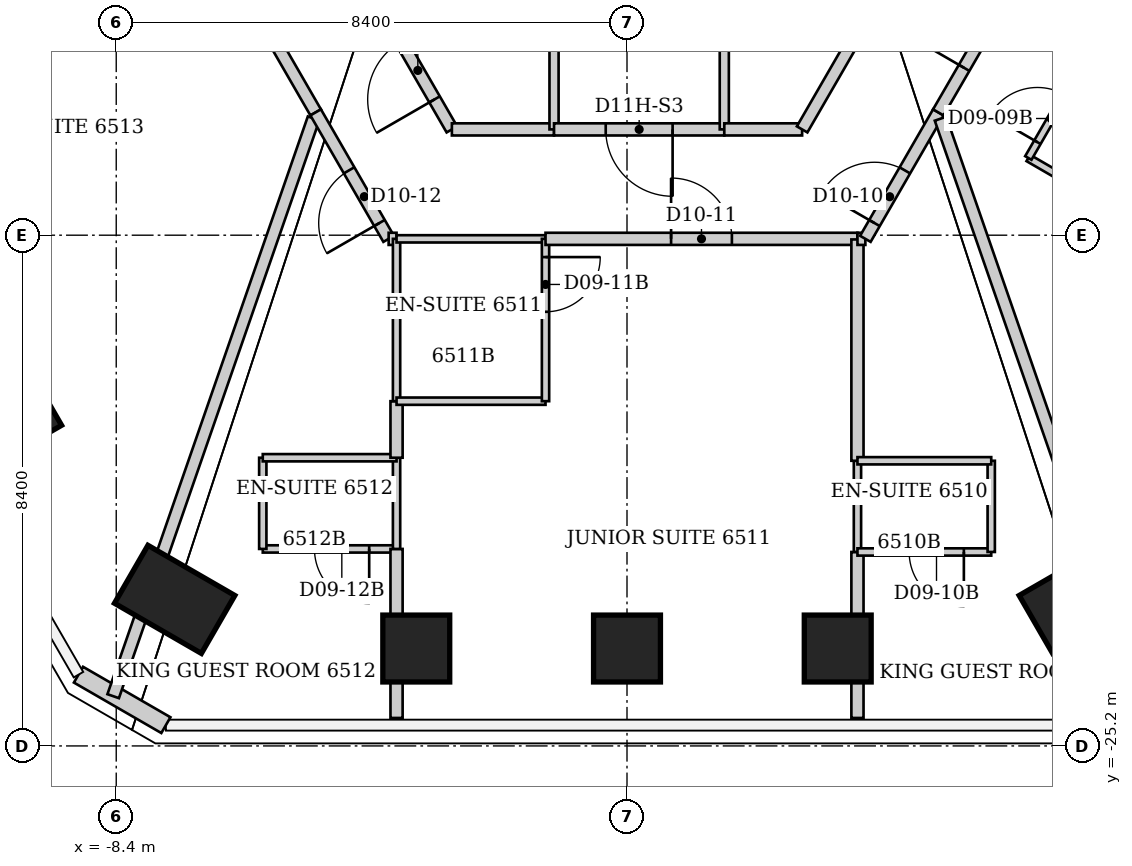
"""IFC4 building model, lengths in metres.
Left out: names, types, materials, properties, quantities, classifications, styles, units other than length and angle.
Written with IfcOpenShell. Run it as: python <this file> out.ifc"""

import sys

from ifc_helpers import new_model, si_unit, direction, frame, frame_2d, origin, origin_2d, place, context, subcontext, project, spatial, rectangle, extrude, element, fill, save


model = new_model("IFC4")
c1 = context("Model", 3, precision=1e-05, world=origin(), true_north=direction((0.0, 1.0)))
c2 = subcontext(c1, "Body", "Model", "MODEL_VIEW")
j1 = project(units=[si_unit("LENGTHUNIT", "METRE"), si_unit("PLANEANGLEUNIT", "RADIAN")], contexts=[c1])
p1 = place(None, origin())
s1 = spatial("IfcSite", under=j1, at=p1, CompositionType="ELEMENT")
p2 = place(p1, origin())
s2 = spatial("IfcBuilding", under=s1, at=p2, CompositionType="ELEMENT")
p3 = place(p2, frame((0.0, 0.0, 260.8)))
s3 = spatial("IfcBuildingStorey", under=s2, at=p3, CompositionType="ELEMENT", Elevation=260.8)
p4 = place(p3, frame((7.439, -22.79, 0.0), z_axis=(0.0, 0.0, 1.0), x_axis=(0.5, -0.866025403784, 0.0)))
e1 = element("IfcColumn", 1, at=p4, inside=s3, PredefinedType="COLUMN", context=c2, shape_type="SweptSolid", body=[
    extrude(rectangle(XDim=1.1, YDim=1.65, at=origin_2d()), origin(), (0.0, 0.0, 1.0), 3.8),
])
for number, where, z_axis, x_axis in (
    (2, (3.466, -23.598, 0.0), (0.0, 0.0, 1.0), (0.0, -1.0, 0.0)),
    (3, (0.0, -23.598, 0.0), (0.0, 0.0, 1.0), (0.0, -1.0, 0.0)),
    (4, (-3.466, -23.598, 0.0), (0.0, 0.0, 1.0), (0.0, -1.0, 0.0)),
):
    element("IfcColumn", number, at=place(p3, frame(where, z_axis=z_axis, x_axis=x_axis)), inside=s3, PredefinedType="COLUMN", context=c2, shape_type="SweptSolid", body=[
        extrude(rectangle(XDim=1.1, YDim=1.1, at=origin_2d()), origin(), (0.0, 0.0, 1.0), 3.8),
    ])
p5 = place(p3, frame((-7.439, -22.79, 0.0), z_axis=(0.0, 0.0, 1.0), x_axis=(-0.5, -0.866025403784, 0.0)))
e5 = element("IfcColumn", 5, at=p5, inside=s3, PredefinedType="COLUMN", context=c2, shape_type="SweptSolid", body=[
    extrude(rectangle(XDim=1.1, YDim=1.65, at=origin_2d()), origin(), (0.0, 0.0, 1.0), 3.8),
])
p6 = place(p3, frame((-10.05, -19.725, 0.0), z_axis=(0.0, 0.0, 1.0), x_axis=(-0.866025403784, -0.5, 0.0)))
e6 = element("IfcColumn", 6, at=p6, inside=s3, PredefinedType="COLUMN", context=c2, shape_type="SweptSolid", body=[
    extrude(rectangle(XDim=1.1, YDim=1.1, at=origin_2d()), origin(), (0.0, 0.0, 1.0), 3.8),
])
p7 = place(p3, frame((-7.583, -24.858, 0.0), z_axis=(0.0, 0.0, 1.0), x_axis=(-0.865989634427, 0.500061949227, 0.0)))
e7 = element("IfcWall", 7, at=p7, inside=s3, PredefinedType="SOLIDWALL", context=c2, shape_type="SweptSolid", body=[
    extrude(rectangle(XDim=1.66, YDim=0.3, at=frame_2d((0.83, 0.0))), origin(), (0.0, 0.0, 1.0), 3.64),
])
p8 = place(p3, frame((-8.45, -24.382, 0.0), z_axis=(0.0, 0.0, 1.0), x_axis=(0.327695764917, 0.944783300898, 0.0)))
e8 = element("IfcWall", 8, at=p8, inside=s3, PredefinedType="PARTITIONING", context=c2, shape_type="SweptSolid", body=[
    extrude(rectangle(XDim=10.058, YDim=0.2, at=frame_2d((5.029, 0.0))), origin(), (0.0, 0.0, 1.0), 3.64),
])
p9 = place(p3, frame((-8.11, -9.6, 0.0), z_axis=(0.0, 0.0, 1.0), x_axis=(0.49991915452, -0.866072074913, 0.0)))
e9 = element("IfcWall", 9, at=p9, inside=s3, PredefinedType="PARTITIONING", context=c2, shape_type="SweptSolid", body=[
    extrude(rectangle(XDim=5.981, YDim=0.2, at=frame_2d((2.99, 0.0))), origin(), (0.0, 0.0, 1.0), 3.64),
])
p10 = place(p9, frame((2.49, 0.0, 0.0)))
e10 = element("IfcOpeningElement", 10, at=p10, cuts=e9, PredefinedType="OPENING", context=c2, shape_type="SweptSolid", body=[
    extrude(rectangle(XDim=1.0, YDim=2.13, at=frame_2d((0.5, 1.065))), frame((0.0, 0.1, 0.0), z_axis=(0.0, -1.0, 0.0), x_axis=(1.0, 0.0, 0.0)), (0.0, 0.0, 1.0), 0.2),
])
p11 = place(p3, frame((-5.99, -21.96, 0.0), z_axis=(0.0, 0.0, 1.0), x_axis=(1.0, 0.0, 0.0)))
e11 = element("IfcWall", 11, at=p11, inside=s3, PredefinedType="PARTITIONING", context=c2, shape_type="SweptSolid", body=[
    extrude(rectangle(XDim=2.2, YDim=0.12, at=frame_2d((1.1, 0.0))), origin(), (0.0, 0.0, 1.0), 3.64),
])
p12 = place(p11, frame((0.85, 0.0, 0.0)))
e12 = element("IfcOpeningElement", 12, at=p12, cuts=e11, PredefinedType="OPENING", context=c2, shape_type="SweptSolid", body=[
    extrude(rectangle(XDim=0.9, YDim=2.03, at=frame_2d((0.45, 1.015))), frame((0.0, 0.06, 0.0), z_axis=(0.0, -1.0, 0.0), x_axis=(1.0, 0.0, 0.0)), (0.0, 0.0, 1.0), 0.12),
])
p13 = place(p3, frame((-5.99, -20.46, 0.0), z_axis=(0.0, 0.0, 1.0), x_axis=(0.0, -1.0, 0.0)))
e13 = element("IfcWall", 13, at=p13, inside=s3, PredefinedType="PARTITIONING", context=c2, shape_type="SweptSolid", body=[
    extrude(rectangle(XDim=1.5, YDim=0.12, at=frame_2d((0.75, 0.0))), origin(), (0.0, 0.0, 1.0), 3.64),
])
p14 = place(p3, frame((-5.12, -14.78, 0.0), z_axis=(0.0, 0.0, 1.0), x_axis=(0.499813401482, -0.866133109688, 0.0)))
e14 = element("IfcWall", 14, at=p14, inside=s3, PredefinedType="PARTITIONING", context=c2, shape_type="SweptSolid", body=[
    extrude(rectangle(XDim=2.401, YDim=0.2, at=frame_2d((1.201, 0.0))), origin(), (0.0, 0.0, 1.0), 3.64),
])
p15 = place(p14, frame((1.1, 0.0, 0.0)))
e15 = element("IfcOpeningElement", 15, at=p15, cuts=e14, PredefinedType="OPENING", context=c2, shape_type="SweptSolid", body=[
    extrude(rectangle(XDim=1.0, YDim=2.13, at=frame_2d((0.5, 1.065))), frame((0.0, 0.1, 0.0), z_axis=(0.0, -1.0, 0.0), x_axis=(1.0, 0.0, 0.0)), (0.0, 0.0, 1.0), 0.2),
])
p16 = place(p3, frame((-3.92, -16.86, 0.0), z_axis=(0.0, 0.0, 1.0), x_axis=(1.0, 0.0, 0.0)))
e16 = element("IfcWall", 16, at=p16, inside=s3, PredefinedType="PARTITIONING", context=c2, shape_type="SweptSolid", body=[
    extrude(rectangle(XDim=0.13, YDim=0.2, at=frame_2d((0.065, 0.0))), origin(), (0.0, 0.0, 1.0), 3.64),
])
p17 = place(p3, frame((-3.79, -24.74, 0.0), z_axis=(0.0, 0.0, 1.0), x_axis=(0.0, 1.0, 0.0)))
e17 = element("IfcWall", 17, at=p17, inside=s3, PredefinedType="PARTITIONING", context=c2, shape_type="SweptSolid", body=[
    extrude(rectangle(XDim=2.78, YDim=0.2, at=frame_2d((1.39, 0.0))), origin(), (0.0, 0.0, 1.0), 3.64),
])
p18 = place(p3, frame((-3.79, -21.96, 0.0), z_axis=(0.0, 0.0, 1.0), x_axis=(0.0, 1.0, 0.0)))
e18 = element("IfcWall", 18, at=p18, inside=s3, PredefinedType="PARTITIONING", context=c2, shape_type="SweptSolid", body=[
    extrude(rectangle(XDim=1.5, YDim=0.12, at=frame_2d((0.75, 0.0))), origin(), (0.0, 0.0, 1.0), 3.64),
])
p19 = place(p3, frame((-3.79, -20.46, 0.0), z_axis=(0.0, 0.0, 1.0), x_axis=(-1.0, 0.0, 0.0)))
e19 = element("IfcWall", 19, at=p19, inside=s3, PredefinedType="PARTITIONING", context=c2, shape_type="SweptSolid", body=[
    extrude(rectangle(XDim=2.2, YDim=0.12, at=frame_2d((1.1, 0.0))), origin(), (0.0, 0.0, 1.0), 3.64),
])
p20 = place(p3, frame((-3.79, -20.46, 0.0), z_axis=(0.0, 0.0, 1.0), x_axis=(0.0, 1.0, 0.0)))
e20 = element("IfcWall", 20, at=p20, inside=s3, PredefinedType="PARTITIONING", context=c2, shape_type="SweptSolid", body=[
    extrude(rectangle(XDim=0.93, YDim=0.2, at=frame_2d((0.465, 0.0))), origin(), (0.0, 0.0, 1.0), 3.64),
])
p21 = place(p3, frame((-3.79, -19.53, 0.0), z_axis=(0.0, 0.0, 1.0), x_axis=(0.0, 1.0, 0.0)))
e21 = element("IfcWall", 21, at=p21, inside=s3, PredefinedType="PARTITIONING", context=c2, shape_type="SweptSolid", body=[
    extrude(rectangle(XDim=2.67, YDim=0.12, at=frame_2d((1.335, 0.0))), origin(), (0.0, 0.0, 1.0), 3.64),
])
for number, where, z_axis, x_axis in (
    (22, (-3.79, -19.53, 0.0), (0.0, 0.0, 1.0), (1.0, 0.0, 0.0)),
    (23, (-3.79, -16.86, 0.0), (0.0, 0.0, 1.0), (1.0, 0.0, 0.0)),
):
    element("IfcWall", number, at=place(p3, frame(where, z_axis=z_axis, x_axis=x_axis)), inside=s3, PredefinedType="PARTITIONING", context=c2, shape_type="SweptSolid", body=[
        extrude(rectangle(XDim=2.45, YDim=0.12, at=frame_2d((1.225, 0.0))), origin(), (0.0, 0.0, 1.0), 3.64),
    ])
p22 = place(p3, frame((-2.88, -15.06, 0.0), z_axis=(0.0, 0.0, 1.0), x_axis=(-0.499983441833, 0.866034963436, 0.0)))
e24 = element("IfcWall", 24, at=p22, inside=s3, PredefinedType="PARTITIONING", context=c2, shape_type="SweptSolid", body=[
    extrude(rectangle(XDim=2.24, YDim=0.2, at=frame_2d((1.12, 0.0))), origin(), (0.0, 0.0, 1.0), 3.64),
])
p23 = place(p22, frame((0.57, 0.0, 0.0)))
e25 = element("IfcOpeningElement", 25, at=p23, cuts=e24, PredefinedType="OPENING", context=c2, shape_type="SweptSolid", body=[
    extrude(rectangle(XDim=1.1, YDim=2.2, at=frame_2d((0.55, 1.1))), frame((0.0, 0.1, 0.0), z_axis=(0.0, -1.0, 0.0), x_axis=(1.0, 0.0, 0.0)), (0.0, 0.0, 1.0), 0.2),
])
p24 = place(p3, frame((-1.34, -19.53, 0.0), z_axis=(0.0, 0.0, 1.0), x_axis=(0.0, 1.0, 0.0)))
e26 = element("IfcWall", 26, at=p24, inside=s3, PredefinedType="PARTITIONING", context=c2, shape_type="SweptSolid", body=[
    extrude(rectangle(XDim=2.67, YDim=0.12, at=frame_2d((1.335, 0.0))), origin(), (0.0, 0.0, 1.0), 3.64),
])
p25 = place(p24, frame((1.47, 0.0, 0.0)))
e27 = element("IfcOpeningElement", 27, at=p25, cuts=e26, PredefinedType="OPENING", context=c2, shape_type="SweptSolid", body=[
    extrude(rectangle(XDim=0.9, YDim=2.03, at=frame_2d((0.45, 1.015))), frame((0.0, 0.06, 0.0), z_axis=(0.0, -1.0, 0.0), x_axis=(1.0, 0.0, 0.0)), (0.0, 0.0, 1.0), 0.12),
])
p26 = place(p3, frame((-1.34, -16.86, 0.0), z_axis=(0.0, 0.0, 1.0), x_axis=(1.0, 0.0, 0.0)))
e28 = element("IfcWall", 28, at=p26, inside=s3, PredefinedType="PARTITIONING", context=c2, shape_type="SweptSolid", body=[
    extrude(rectangle(XDim=5.13, YDim=0.2, at=frame_2d((2.565, 0.0))), origin(), (0.0, 0.0, 1.0), 3.64),
])
p27 = place(p26, frame((2.065, 0.0, 0.0)))
e29 = element("IfcOpeningElement", 29, at=p27, cuts=e28, PredefinedType="OPENING", context=c2, shape_type="SweptSolid", body=[
    extrude(rectangle(XDim=1.0, YDim=2.13, at=frame_2d((0.5, 1.065))), frame((0.0, 0.1, 0.0), z_axis=(0.0, -1.0, 0.0), x_axis=(1.0, 0.0, 0.0)), (0.0, 0.0, 1.0), 0.2),
])
p28 = place(p3, frame((-1.2, -15.06, 0.0), z_axis=(0.0, 0.0, 1.0), x_axis=(-1.0, 0.0, 0.0)))
e30 = element("IfcWall", 30, at=p28, inside=s3, PredefinedType="PARTITIONING", context=c2, shape_type="SweptSolid", body=[
    extrude(rectangle(XDim=1.68, YDim=0.2, at=frame_2d((0.84, 0.0))), origin(), (0.0, 0.0, 1.0), 3.64),
])
p29 = place(p3, frame((-1.2, -6.7, 0.0), z_axis=(0.0, 0.0, 1.0), x_axis=(0.0, -1.0, 0.0)))
e31 = element("IfcWall", 31, at=p29, inside=s3, PredefinedType="PARTITIONING", context=c2, shape_type="SweptSolid", body=[
    extrude(rectangle(XDim=8.36, YDim=0.15, at=frame_2d((4.18, 0.0))), origin(), (0.0, 0.0, 1.0), 3.64),
])
p30 = place(p3, frame((1.6, -15.06, 0.0), z_axis=(0.0, 0.0, 1.0), x_axis=(-1.0, 0.0, 0.0)))
e32 = element("IfcWall", 32, at=p30, inside=s3, PredefinedType="PARTITIONING", context=c2, shape_type="SweptSolid", body=[
    extrude(rectangle(XDim=2.8, YDim=0.2, at=frame_2d((1.4, 0.0))), origin(), (0.0, 0.0, 1.0), 3.64),
])
p31 = place(p30, frame((0.85, 0.0, 0.0)))
e33 = element("IfcOpeningElement", 33, at=p31, cuts=e32, PredefinedType="OPENING", context=c2, shape_type="SweptSolid", body=[
    extrude(rectangle(XDim=1.1, YDim=2.2, at=frame_2d((0.55, 1.1))), frame((0.0, 0.1, 0.0), z_axis=(0.0, -1.0, 0.0), x_axis=(1.0, 0.0, 0.0)), (0.0, 0.0, 1.0), 0.2),
])
p32 = place(p3, frame((1.6, -6.7, 0.0), z_axis=(0.0, 0.0, 1.0), x_axis=(0.0, -1.0, 0.0)))
e34 = element("IfcWall", 34, at=p32, inside=s3, PredefinedType="PARTITIONING", context=c2, shape_type="SweptSolid", body=[
    extrude(rectangle(XDim=8.36, YDim=0.15, at=frame_2d((4.18, 0.0))), origin(), (0.0, 0.0, 1.0), 2.86),
])
p33 = place(p3, frame((2.88, -15.06, 0.0), z_axis=(0.0, 0.0, 1.0), x_axis=(-1.0, 0.0, 0.0)))
e35 = element("IfcWall", 35, at=p33, inside=s3, PredefinedType="PARTITIONING", context=c2, shape_type="SweptSolid", body=[
    extrude(rectangle(XDim=1.28, YDim=0.2, at=frame_2d((0.64, 0.0))), origin(), (0.0, 0.0, 1.0), 3.64),
])
p34 = place(p3, frame((3.79, -24.74, 0.0), z_axis=(0.0, 0.0, 1.0), x_axis=(0.0, 1.0, 0.0)))
e36 = element("IfcWall", 36, at=p34, inside=s3, PredefinedType="PARTITIONING", context=c2, shape_type="SweptSolid", body=[
    extrude(rectangle(XDim=2.73, YDim=0.2, at=frame_2d((1.365, 0.0))), origin(), (0.0, 0.0, 1.0), 3.64),
])
p35 = place(p3, frame((3.79, -22.01, 0.0), z_axis=(0.0, 0.0, 1.0), x_axis=(0.0, 1.0, 0.0)))
e37 = element("IfcWall", 37, at=p35, inside=s3, PredefinedType="PARTITIONING", context=c2, shape_type="SweptSolid", body=[
    extrude(rectangle(XDim=1.5, YDim=0.12, at=frame_2d((0.75, 0.0))), origin(), (0.0, 0.0, 1.0), 3.64),
])
p36 = place(p3, frame((3.79, -22.01, 0.0), z_axis=(0.0, 0.0, 1.0), x_axis=(1.0, 0.0, 0.0)))
e38 = element("IfcWall", 38, at=p36, inside=s3, PredefinedType="PARTITIONING", context=c2, shape_type="SweptSolid", body=[
    extrude(rectangle(XDim=2.2, YDim=0.12, at=frame_2d((1.1, 0.0))), origin(), (0.0, 0.0, 1.0), 3.64),
])
p37 = place(p36, frame((0.85, 0.0, 0.0)))
e39 = element("IfcOpeningElement", 39, at=p37, cuts=e38, PredefinedType="OPENING", context=c2, shape_type="SweptSolid", body=[
    extrude(rectangle(XDim=0.9, YDim=2.03, at=frame_2d((0.45, 1.015))), frame((0.0, 0.06, 0.0), z_axis=(0.0, -1.0, 0.0), x_axis=(1.0, 0.0, 0.0)), (0.0, 0.0, 1.0), 0.12),
])
p38 = place(p3, frame((3.79, -20.51, 0.0), z_axis=(0.0, 0.0, 1.0), x_axis=(0.0, 1.0, 0.0)))
e40 = element("IfcWall", 40, at=p38, inside=s3, PredefinedType="PARTITIONING", context=c2, shape_type="SweptSolid", body=[
    extrude(rectangle(XDim=3.64, YDim=0.2, at=frame_2d((1.82, 0.0))), origin(), (0.0, 0.0, 1.0), 3.64),
])
p39 = place(p3, frame((3.79, -16.86, 0.0), z_axis=(0.0, 0.0, 1.0), x_axis=(1.0, 0.0, 0.0)))
e41 = element("IfcWall", 41, at=p39, inside=s3, PredefinedType="PARTITIONING", context=c2, shape_type="SweptSolid", body=[
    extrude(rectangle(XDim=0.13, YDim=0.2, at=frame_2d((0.065, 0.0))), origin(), (0.0, 0.0, 1.0), 3.64),
])
p40 = place(p3, frame((3.92, -16.86, 0.0), z_axis=(0.0, 0.0, 1.0), x_axis=(0.499693115345, 0.866202511239, 0.0)))
e42 = element("IfcWall", 42, at=p40, inside=s3, PredefinedType="PARTITIONING", context=c2, shape_type="SweptSolid", body=[
    extrude(rectangle(XDim=2.401, YDim=0.2, at=frame_2d((1.201, 0.0))), origin(), (0.0, 0.0, 1.0), 3.64),
])
p41 = place(p40, frame((0.3, 0.0, 0.0)))
e43 = element("IfcOpeningElement", 43, at=p41, cuts=e42, PredefinedType="OPENING", context=c2, shape_type="SweptSolid", body=[
    extrude(rectangle(XDim=1.0, YDim=2.13, at=frame_2d((0.5, 1.065))), frame((0.0, 0.1, 0.0), z_axis=(0.0, -1.0, 0.0), x_axis=(1.0, 0.0, 0.0)), (0.0, 0.0, 1.0), 0.2),
])
p42 = place(p3, frame((5.12, -14.78, 0.0), z_axis=(0.0, 0.0, 1.0), x_axis=(0.501343576294, 0.865248298761, 0.0)))
e44 = element("IfcWall", 44, at=p42, inside=s3, PredefinedType="PARTITIONING", context=c2, shape_type="SweptSolid", body=[
    extrude(rectangle(XDim=2.693, YDim=0.2, at=frame_2d((1.346, 0.0))), origin(), (0.0, 0.0, 1.0), 3.64),
])
p43 = place(p42, frame((0.846, 0.0, 0.0)))
e45 = element("IfcOpeningElement", 45, at=p43, cuts=e44, PredefinedType="OPENING", context=c2, shape_type="SweptSolid", body=[
    extrude(rectangle(XDim=1.0, YDim=2.13, at=frame_2d((0.5, 1.065))), frame((0.0, 0.1, 0.0), z_axis=(0.0, -1.0, 0.0), x_axis=(1.0, 0.0, 0.0)), (0.0, 0.0, 1.0), 0.2),
])
p44 = place(p3, frame((5.99, -22.01, 0.0), z_axis=(0.0, 0.0, 1.0), x_axis=(0.0, 1.0, 0.0)))
e46 = element("IfcWall", 46, at=p44, inside=s3, PredefinedType="PARTITIONING", context=c2, shape_type="SweptSolid", body=[
    extrude(rectangle(XDim=1.5, YDim=0.12, at=frame_2d((0.75, 0.0))), origin(), (0.0, 0.0, 1.0), 3.64),
])
p45 = place(p3, frame((5.99, -20.51, 0.0), z_axis=(0.0, 0.0, 1.0), x_axis=(-1.0, 0.0, 0.0)))
e47 = element("IfcWall", 47, at=p45, inside=s3, PredefinedType="PARTITIONING", context=c2, shape_type="SweptSolid", body=[
    extrude(rectangle(XDim=2.2, YDim=0.12, at=frame_2d((1.1, 0.0))), origin(), (0.0, 0.0, 1.0), 3.64),
])
p46 = place(p3, frame((6.6, -15.53, 0.0), z_axis=(0.0, 0.0, 1.0), x_axis=(0.865130376012, -0.501547039172, 0.0)))
e48 = element("IfcWall", 48, at=p46, inside=s3, PredefinedType="PARTITIONING", context=c2, shape_type="SweptSolid", body=[
    extrude(rectangle(XDim=2.393, YDim=0.12, at=frame_2d((1.196, 0.0))), origin(), (0.0, 0.0, 1.0), 3.64),
])
p47 = place(p3, frame((7.68, -6.75, 0.0), z_axis=(0.0, 0.0, 1.0), x_axis=(-0.500174600737, -0.865924574532, 0.0)))
e49 = element("IfcWall", 49, at=p47, inside=s3, PredefinedType="PARTITIONING", context=c2, shape_type="SweptSolid", body=[
    extrude(rectangle(XDim=9.597, YDim=0.2, at=frame_2d((4.798, 0.0))), origin(), (0.0, 0.0, 1.0), 3.64),
])
p48 = place(p47, frame((4.248, 0.0, 0.0)))
e50 = element("IfcOpeningElement", 50, at=p48, cuts=e49, PredefinedType="OPENING", context=c2, shape_type="SweptSolid", body=[
    extrude(rectangle(XDim=1.1, YDim=2.2, at=frame_2d((0.55, 1.1))), frame((0.0, 0.1, 0.0), z_axis=(0.0, -1.0, 0.0), x_axis=(1.0, 0.0, 0.0)), (0.0, 0.0, 1.0), 0.2),
])
p49 = place(p3, frame((7.9, -13.28, 0.0), z_axis=(0.0, 0.0, 1.0), x_axis=(-0.500221244143, -0.865897630733, 0.0)))
e51 = element("IfcWall", 51, at=p49, inside=s3, PredefinedType="PARTITIONING", context=c2, shape_type="SweptSolid", body=[
    extrude(rectangle(XDim=2.598, YDim=0.12, at=frame_2d((1.299, 0.0))), origin(), (0.0, 0.0, 1.0), 3.64),
])
p50 = place(p49, frame((1.399, 0.0, 0.0)))
e52 = element("IfcOpeningElement", 52, at=p50, cuts=e51, PredefinedType="OPENING", context=c2, shape_type="SweptSolid", body=[
    extrude(rectangle(XDim=0.9, YDim=2.03, at=frame_2d((0.45, 1.015))), frame((0.0, 0.06, 0.0), z_axis=(0.0, -1.0, 0.0), x_axis=(1.0, 0.0, 0.0)), (0.0, 0.0, 1.0), 0.12),
])
p51 = place(p3, frame((8.45, -24.382, 0.0), z_axis=(0.0, 0.0, 1.0), x_axis=(-0.327686879249, 0.944786382823, 0.0)))
e53 = element("IfcWall", 53, at=p51, inside=s3, PredefinedType="PARTITIONING", context=c2, shape_type="SweptSolid", body=[
    extrude(rectangle(XDim=10.053, YDim=0.2, at=frame_2d((5.026, 0.0))), origin(), (0.0, 0.0, 1.0), 3.64),
])
p52 = place(p43, origin())
e54 = element("IfcDoor", 54, at=p52, inside=s3, OperationType="SINGLE_SWING_LEFT", PredefinedType="DOOR", context=c2, shape_type="SweptSolid", body=[
    extrude(rectangle(XDim=1.0, YDim=2.13, at=frame_2d((0.5, 1.065))), frame((0.0, 0.025, 0.0), z_axis=(0.0, -1.0, 0.0), x_axis=(1.0, 0.0, 0.0)), (0.0, 0.0, 1.0), 0.05),
])
fill(e45, e54)
p53 = place(p50, origin())
e55 = element("IfcDoor", 55, at=p53, inside=s3, OperationType="SINGLE_SWING_RIGHT", PredefinedType="DOOR", context=c2, shape_type="SweptSolid", body=[
    extrude(rectangle(XDim=0.9, YDim=2.03, at=frame_2d((0.45, 1.015))), frame((0.0, 0.025, 0.0), z_axis=(0.0, -1.0, 0.0), x_axis=(1.0, 0.0, 0.0)), (0.0, 0.0, 1.0), 0.05),
])
fill(e52, e55)
p54 = place(p41, origin())
e56 = element("IfcDoor", 56, at=p54, inside=s3, OperationType="SINGLE_SWING_LEFT", PredefinedType="DOOR", context=c2, shape_type="SweptSolid", body=[
    extrude(rectangle(XDim=1.0, YDim=2.13, at=frame_2d((0.5, 1.065))), frame((0.0, 0.025, 0.0), z_axis=(0.0, -1.0, 0.0), x_axis=(1.0, 0.0, 0.0)), (0.0, 0.0, 1.0), 0.05),
])
fill(e43, e56)
p55 = place(p37, origin())
e57 = element("IfcDoor", 57, at=p55, inside=s3, OperationType="SINGLE_SWING_RIGHT", PredefinedType="DOOR", context=c2, shape_type="SweptSolid", body=[
    extrude(rectangle(XDim=0.9, YDim=2.03, at=frame_2d((0.45, 1.015))), frame((0.0, 0.025, 0.0), z_axis=(0.0, -1.0, 0.0), x_axis=(1.0, 0.0, 0.0)), (0.0, 0.0, 1.0), 0.05),
])
fill(e39, e57)
p56 = place(p27, origin())
e58 = element("IfcDoor", 58, at=p56, inside=s3, OperationType="SINGLE_SWING_LEFT", PredefinedType="DOOR", context=c2, shape_type="SweptSolid", body=[
    extrude(rectangle(XDim=1.0, YDim=2.13, at=frame_2d((0.5, 1.065))), frame((0.0, 0.025, 0.0), z_axis=(0.0, -1.0, 0.0), x_axis=(1.0, 0.0, 0.0)), (0.0, 0.0, 1.0), 0.05),
])
fill(e29, e58)
p57 = place(p25, origin())
e59 = element("IfcDoor", 59, at=p57, inside=s3, OperationType="SINGLE_SWING_RIGHT", PredefinedType="DOOR", context=c2, shape_type="SweptSolid", body=[
    extrude(rectangle(XDim=0.9, YDim=2.03, at=frame_2d((0.45, 1.015))), frame((0.0, 0.025, 0.0), z_axis=(0.0, -1.0, 0.0), x_axis=(1.0, 0.0, 0.0)), (0.0, 0.0, 1.0), 0.05),
])
fill(e27, e59)
p58 = place(p15, origin())
e60 = element("IfcDoor", 60, at=p58, inside=s3, OperationType="SINGLE_SWING_RIGHT", PredefinedType="DOOR", context=c2, shape_type="SweptSolid", body=[
    extrude(rectangle(XDim=1.0, YDim=2.13, at=frame_2d((0.5, 1.065))), frame((0.0, 0.025, 0.0), z_axis=(0.0, -1.0, 0.0), x_axis=(1.0, 0.0, 0.0)), (0.0, 0.0, 1.0), 0.05),
])
fill(e15, e60)
p59 = place(p12, origin())
e61 = element("IfcDoor", 61, at=p59, inside=s3, OperationType="SINGLE_SWING_RIGHT", PredefinedType="DOOR", context=c2, shape_type="SweptSolid", body=[
    extrude(rectangle(XDim=0.9, YDim=2.03, at=frame_2d((0.45, 1.015))), frame((0.0, 0.025, 0.0), z_axis=(0.0, -1.0, 0.0), x_axis=(1.0, 0.0, 0.0)), (0.0, 0.0, 1.0), 0.05),
])
fill(e12, e61)
p60 = place(p23, origin())
e62 = element("IfcDoor", 62, at=p60, inside=s3, OperationType="SINGLE_SWING_LEFT", PredefinedType="DOOR", context=c2, shape_type="SweptSolid", body=[
    extrude(rectangle(XDim=1.1, YDim=2.2, at=frame_2d((0.55, 1.1))), frame((0.0, 0.025, 0.0), z_axis=(0.0, -1.0, 0.0), x_axis=(1.0, 0.0, 0.0)), (0.0, 0.0, 1.0), 0.05),
])
fill(e25, e62)
p61 = place(p31, origin())
e63 = element("IfcDoor", 63, at=p61, inside=s3, OperationType="SINGLE_SWING_LEFT", PredefinedType="DOOR", context=c2, shape_type="SweptSolid", body=[
    extrude(rectangle(XDim=1.1, YDim=2.2, at=frame_2d((0.55, 1.1))), frame((0.0, 0.025, 0.0), z_axis=(0.0, -1.0, 0.0), x_axis=(1.0, 0.0, 0.0)), (0.0, 0.0, 1.0), 0.05),
])
fill(e33, e63)
save(model, sys.argv[1])
